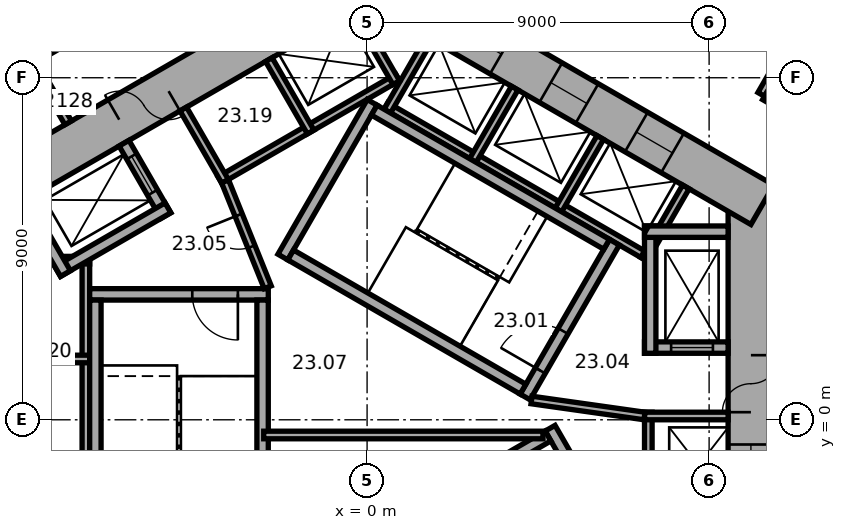
"""IFC4 building model, lengths in metres.
Left out: names, types, materials, properties, quantities, classifications, styles, units other than length and angle.
Written with IfcOpenShell. Run it as: python <this file> out.ifc"""

import sys

from ifc_helpers import new_model, si_unit, direction, frame, frame_2d, origin, place, context, subcontext, project, spatial, rectangle, extrude, element, fill, save


model = new_model("IFC4")
c1 = context("Model", 3, precision=1e-05, world=origin(), true_north=direction((0.0, 1.0)))
c2 = subcontext(c1, "Body", "Model", "MODEL_VIEW")
j1 = project(units=[si_unit("LENGTHUNIT", "METRE"), si_unit("PLANEANGLEUNIT", "RADIAN")], contexts=[c1])
p1 = place(None, origin())
s1 = spatial("IfcSite", under=j1, at=p1, CompositionType="ELEMENT")
p2 = place(p1, origin())
s2 = spatial("IfcBuilding", under=s1, at=p2, CompositionType="ELEMENT")
p3 = place(p2, frame((0.0, 0.0, 100.1)))
s3 = spatial("IfcBuildingStorey", under=s2, at=p3, CompositionType="ELEMENT", Elevation=100.1)
p4 = place(p3, frame((10.1, -6.177, 0.0), z_axis=(0.0, 0.0, 1.0), x_axis=(0.0, 1.0, 0.0)))
e1 = element("IfcWall", 1, at=p4, inside=s3, PredefinedType="SHEAR", context=c2, shape_type="SweptSolid", body=[
    extrude(rectangle(XDim=12.355, YDim=1.2, at=frame_2d((6.177, 0.0))), origin(), (0.0, 0.0, 1.0), 3.3),
])
p5 = place(p4, frame((6.378, 0.0, 0.0)))
e2 = element("IfcOpeningElement", 2, at=p5, cuts=e1, PredefinedType="OPENING", context=c2, shape_type="SweptSolid", body=[
    extrude(rectangle(XDim=1.5, YDim=2.1, at=frame_2d((0.75, 1.05))), frame((0.0, 0.61, 0.0), z_axis=(0.0, -1.0, 0.0), x_axis=(1.0, 0.0, 0.0)), (0.0, 0.0, 1.0), 1.22),
])
p6 = place(p4, frame((1.828, 0.0, 0.0)))
e3 = element("IfcOpeningElement", 3, at=p6, cuts=e1, PredefinedType="OPENING", context=c2, shape_type="SweptSolid", body=[
    extrude(rectangle(XDim=1.1, YDim=2.1, at=frame_2d((0.55, 1.05))), frame((0.0, 0.61, 0.0), z_axis=(0.0, -1.0, 0.0), x_axis=(1.0, 0.0, 0.0)), (0.0, 0.0, 1.0), 1.22),
])
p7 = place(p4, frame((4.427, 0.0, 0.0)))
e4 = element("IfcOpeningElement", 4, at=p7, cuts=e1, PredefinedType="OPENING", context=c2, shape_type="SweptSolid", body=[
    extrude(rectangle(XDim=1.1, YDim=2.1, at=frame_2d((0.55, 1.05))), frame((0.0, 0.61, 0.0), z_axis=(0.0, -1.0, 0.0), x_axis=(1.0, 0.0, 0.0)), (0.0, 0.0, 1.0), 1.22),
])
p8 = place(p3, frame((10.4, 5.658, 0.0), z_axis=(0.0, 0.0, 1.0), x_axis=(-0.866021384402, 0.500006961711, 0.0)))
e5 = element("IfcWall", 5, at=p8, inside=s3, PredefinedType="SHEAR", context=c2, shape_type="SweptSolid", body=[
    extrude(rectangle(XDim=12.355, YDim=1.2, at=frame_2d((6.178, 0.0))), origin(), (0.0, 0.0, 1.0), 3.3),
])
p9 = place(p8, frame((2.728, 0.0, 0.0)))
e6 = element("IfcOpeningElement", 6, at=p9, cuts=e5, PredefinedType="OPENING", context=c2, shape_type="SweptSolid", body=[
    extrude(rectangle(XDim=1.1, YDim=2.1, at=frame_2d((0.55, 1.05))), frame((0.0, 0.61, 0.0), z_axis=(0.0, -1.0, 0.0), x_axis=(1.0, 0.0, 0.0)), (0.0, 0.0, 1.0), 1.22),
])
p10 = place(p8, frame((5.328, 0.0, 0.0)))
e7 = element("IfcOpeningElement", 7, at=p10, cuts=e5, PredefinedType="OPENING", context=c2, shape_type="SweptSolid", body=[
    extrude(rectangle(XDim=1.1, YDim=2.1, at=frame_2d((0.55, 1.05))), frame((0.0, 0.61, 0.0), z_axis=(0.0, -1.0, 0.0), x_axis=(1.0, 0.0, 0.0)), (0.0, 0.0, 1.0), 1.22),
])
p11 = place(p8, frame((7.928, 0.0, 0.0)))
e8 = element("IfcOpeningElement", 8, at=p11, cuts=e5, PredefinedType="OPENING", context=c2, shape_type="SweptSolid", body=[
    extrude(rectangle(XDim=1.1, YDim=2.1, at=frame_2d((0.55, 1.05))), frame((0.0, 0.61, 0.0), z_axis=(0.0, -1.0, 0.0), x_axis=(1.0, 0.0, 0.0)), (0.0, 0.0, 1.0), 1.22),
])
p12 = place(p3, frame((0.3, 11.836, 0.0), z_axis=(0.0, 0.0, 1.0), x_axis=(-0.866021384402, -0.500006961711, 0.0)))
e9 = element("IfcWall", 9, at=p12, inside=s3, PredefinedType="SHEAR", context=c2, shape_type="SweptSolid", body=[
    extrude(rectangle(XDim=12.355, YDim=1.2, at=frame_2d((6.178, 0.0))), origin(), (0.0, 0.0, 1.0), 3.3),
])
p13 = place(p12, frame((6.378, 0.0, 0.0)))
e10 = element("IfcOpeningElement", 10, at=p13, cuts=e9, PredefinedType="OPENING", context=c2, shape_type="SweptSolid", body=[
    extrude(rectangle(XDim=1.5, YDim=2.1, at=frame_2d((0.75, 1.05))), frame((0.0, 0.61, 0.0), z_axis=(0.0, -1.0, 0.0), x_axis=(1.0, 0.0, 0.0)), (0.0, 0.0, 1.0), 1.22),
])
p14 = place(p12, frame((1.828, 0.0, 0.0)))
e11 = element("IfcOpeningElement", 11, at=p14, cuts=e9, PredefinedType="OPENING", context=c2, shape_type="SweptSolid", body=[
    extrude(rectangle(XDim=1.1, YDim=2.1, at=frame_2d((0.55, 1.05))), frame((0.0, 0.61, 0.0), z_axis=(0.0, -1.0, 0.0), x_axis=(1.0, 0.0, 0.0)), (0.0, 0.0, 1.0), 1.22),
])
p15 = place(p3, frame((7.4, -5.2, 0.0), z_axis=(0.0, 0.0, 1.0), x_axis=(0.0, 1.0, 0.0)))
e12 = element("IfcWall", 12, at=p15, inside=s3, PredefinedType="PARTITIONING", context=c2, shape_type="SweptSolid", body=[
    extrude(rectangle(XDim=5.4, YDim=0.2, at=frame_2d((2.7, 0.0))), origin(), (0.0, 0.0, 1.0), 3.05),
])
p16 = place(p3, frame((7.3, 0.1, 0.0), z_axis=(0.0, 0.0, 1.0), x_axis=(1.0, 0.0, 0.0)))
e13 = element("IfcWall", 13, at=p16, inside=s3, PredefinedType="PARTITIONING", context=c2, shape_type="SweptSolid", body=[
    extrude(rectangle(XDim=2.2, YDim=0.2, at=frame_2d((1.1, 0.0))), origin(), (0.0, 0.0, 1.0), 3.05),
])
p17 = place(p3, frame((7.424, 4.259, 0.0), z_axis=(0.0, 0.0, 1.0), x_axis=(-0.866026010844, 0.49999894854, 0.0)))
e14 = element("IfcWall", 14, at=p17, inside=s3, PredefinedType="PARTITIONING", context=c2, shape_type="SweptSolid", body=[
    extrude(rectangle(XDim=8.0, YDim=0.2, at=frame_2d((4.0, 0.0))), origin(), (0.0, 0.0, 1.0), 3.05),
])
for number, where, z_axis, x_axis in (
    (15, (7.287, 4.222, 0.0), (0.0, 0.0, 1.0), (0.5, 0.866, 0.0)),
    (16, (5.036, 5.522, 0.0), (0.0, 0.0, 1.0), (0.5, 0.866, 0.0)),
    (17, (2.784, 6.822, 0.0), (0.0, 0.0, 1.0), (0.5, 0.866, 0.0)),
    (18, (0.532, 8.122, 0.0), (0.0, 0.0, 1.0), (0.5, 0.866, 0.0)),
):
    element("IfcWall", number, at=place(p3, frame(where, z_axis=z_axis, x_axis=x_axis)), inside=s3, PredefinedType="PARTITIONING", context=c2, shape_type="SweptSolid", body=[
        extrude(rectangle(XDim=2.2, YDim=0.2, at=frame_2d((1.1, 0.0))), origin(), (0.0, 0.0, 1.0), 3.05),
    ])
p18 = place(p3, frame((0.803, 9.009, 0.0), z_axis=(0.0, 0.0, 1.0), x_axis=(-0.866028230842, -0.499995103361, 0.0)))
e19 = element("IfcWall", 19, at=p18, inside=s3, PredefinedType="PARTITIONING", context=c2, shape_type="SweptSolid", body=[
    extrude(rectangle(XDim=5.4, YDim=0.2, at=frame_2d((2.7, 0.0))), origin(), (0.0, 0.0, 1.0), 3.05),
])
p19 = place(p3, frame((0.767, 8.872, 0.0), z_axis=(0.0, 0.0, 1.0), x_axis=(-0.499994660107, 0.866028486751, 0.0)))
e20 = element("IfcWall", 20, at=p19, inside=s3, PredefinedType="PARTITIONING", context=c2, shape_type="SweptSolid", body=[
    extrude(rectangle(XDim=2.2, YDim=0.2, at=frame_2d((1.1, 0.0))), origin(), (0.0, 0.0, 1.0), 3.05),
])
for number, where, z_axis, x_axis in (
    (21, (-1.485, 7.572, 0.0), (0.0, 0.0, 1.0), (-0.5, 0.866, 0.0)),
    (22, (-3.737, 6.272, 0.0), (0.0, 0.0, 1.0), (-0.5, 0.866, 0.0)),
):
    element("IfcWall", number, at=place(p3, frame(where, z_axis=z_axis, x_axis=x_axis)), inside=s3, PredefinedType="PARTITIONING", context=c2, shape_type="SweptSolid", body=[
        extrude(rectangle(XDim=2.2, YDim=0.2, at=frame_2d((1.1, 0.0))), origin(), (0.0, 0.0, 1.0), 3.05),
    ])
p20 = place(p3, frame((-7.4, 4.3, 0.0), z_axis=(0.0, 0.0, 1.0), x_axis=(0.0, -1.0, 0.0)))
e23 = element("IfcWall", 23, at=p20, inside=s3, PredefinedType="PARTITIONING", context=c2, shape_type="SweptSolid", body=[
    extrude(rectangle(XDim=8.0, YDim=0.2, at=frame_2d((4.0, 0.0))), origin(), (0.0, 0.0, 1.0), 3.05),
])
for number, where, z_axis, x_axis in (
    (24, (-7.3, 4.2, 0.0), (0.0, 0.0, 1.0), (-1.0, 0.0, 0.0)),
    (25, (-7.3, 1.6, 0.0), (0.0, 0.0, 1.0), (-1.0, 0.0, 0.0)),
):
    element("IfcWall", number, at=place(p3, frame(where, z_axis=z_axis, x_axis=x_axis)), inside=s3, PredefinedType="PARTITIONING", context=c2, shape_type="SweptSolid", body=[
        extrude(rectangle(XDim=2.2, YDim=0.2, at=frame_2d((1.1, 0.0))), origin(), (0.0, 0.0, 1.0), 3.05),
    ])
p21 = place(p3, frame((4.158, 0.602, 0.0), z_axis=(0.0, 0.0, 1.0), x_axis=(0.499977259774, 0.866038532462, 0.0)))
e26 = element("IfcWall", 26, at=p21, inside=s3, PredefinedType="SHEAR", context=c2, shape_type="SweptSolid", body=[
    extrude(rectangle(XDim=4.7, YDim=0.3, at=frame_2d((2.35, 0.0))), origin(), (0.0, 0.0, 1.0), 3.05),
])
p22 = place(p21, frame((0.8, 0.0, 0.0)))
e27 = element("IfcOpeningElement", 27, at=p22, cuts=e26, PredefinedType="OPENING", context=c2, shape_type="SweptSolid", body=[
    extrude(rectangle(XDim=1.2, YDim=2.1, at=frame_2d((0.6, 1.05))), frame((0.0, 0.16, 0.0), z_axis=(0.0, -1.0, 0.0), x_axis=(1.0, 0.0, 0.0)), (0.0, 0.0, 1.0), 0.32),
])
p23 = place(p3, frame((-2.216, 4.282, 0.0), z_axis=(0.0, 0.0, 1.0), x_axis=(0.499977259774, 0.866038532462, 0.0)))
e28 = element("IfcWall", 28, at=p23, inside=s3, PredefinedType="SHEAR", context=c2, shape_type="SweptSolid", body=[
    extrude(rectangle(XDim=4.7, YDim=0.3, at=frame_2d((2.35, 0.0))), origin(), (0.0, 0.0, 1.0), 3.05),
])
for number, where, z_axis, x_axis in (
    (29, (4.103, 0.807, 0.0), (0.0, 0.0, 1.0), (-0.866, 0.5, 0.0)),
    (30, (6.303, 4.617, 0.0), (0.0, 0.0, 1.0), (-0.866, 0.5, 0.0)),
):
    element("IfcWall", number, at=place(p3, frame(where, z_axis=z_axis, x_axis=x_axis)), inside=s3, PredefinedType="SHEAR", context=c2, shape_type="SweptSolid", body=[
        extrude(rectangle(XDim=7.06, YDim=0.3, at=frame_2d((3.53, 0.0))), origin(), (0.0, 0.0, 1.0), 3.05),
    ])
p24 = place(p3, frame((-2.6, 3.3, 0.0), z_axis=(0.0, 0.0, 1.0), x_axis=(-1.0, 0.0, 0.0)))
e31 = element("IfcWall", 31, at=p24, inside=s3, PredefinedType="SHEAR", context=c2, shape_type="SweptSolid", body=[
    extrude(rectangle(XDim=4.7, YDim=0.3, at=frame_2d((2.35, 0.0))), origin(), (0.0, 0.0, 1.0), 3.05),
])
p25 = place(p24, frame((0.8, 0.0, 0.0)))
e32 = element("IfcOpeningElement", 32, at=p25, cuts=e31, PredefinedType="OPENING", context=c2, shape_type="SweptSolid", body=[
    extrude(rectangle(XDim=1.2, YDim=2.1, at=frame_2d((0.6, 1.05))), frame((0.0, 0.16, 0.0), z_axis=(0.0, -1.0, 0.0), x_axis=(1.0, 0.0, 0.0)), (0.0, 0.0, 1.0), 0.32),
])
for number, where, z_axis, x_axis in (
    (33, (-2.75, 3.15, 0.0), (0.0, 0.0, 1.0), (0.0, -1.0, 0.0)),
    (34, (-7.15, 3.15, 0.0), (0.0, 0.0, 1.0), (0.0, -1.0, 0.0)),
):
    element("IfcWall", number, at=place(p3, frame(where, z_axis=z_axis, x_axis=x_axis)), inside=s3, PredefinedType="SHEAR", context=c2, shape_type="SweptSolid", body=[
        extrude(rectangle(XDim=7.06, YDim=0.3, at=frame_2d((3.53, 0.0))), origin(), (0.0, 0.0, 1.0), 3.05),
    ])
p26 = place(p3, frame((4.816, -0.222, 0.0), z_axis=(0.0, 0.0, 1.0), x_axis=(0.499977259774, -0.866038532462, 0.0)))
e35 = element("IfcWall", 35, at=p26, inside=s3, PredefinedType="SHEAR", context=c2, shape_type="SweptSolid", body=[
    extrude(rectangle(XDim=4.7, YDim=0.3, at=frame_2d((2.35, 0.0))), origin(), (0.0, 0.0, 1.0), 3.05),
])
p27 = place(p3, frame((-1.353, -3.957, 0.0), z_axis=(0.0, 0.0, 1.0), x_axis=(0.866027801685, 0.499995846692, 0.0)))
e36 = element("IfcWall", 36, at=p27, inside=s3, PredefinedType="SHEAR", context=c2, shape_type="SweptSolid", body=[
    extrude(rectangle(XDim=7.06, YDim=0.3, at=frame_2d((3.53, 0.0))), origin(), (0.0, 0.0, 1.0), 3.05),
])
p28 = place(p3, frame((7.3, 1.9, 0.0), z_axis=(0.0, 0.0, 1.0), x_axis=(1.0, 0.0, 0.0)))
e37 = element("IfcWall", 37, at=p28, inside=s3, PredefinedType="SHEAR", context=c2, shape_type="SweptSolid", body=[
    extrude(rectangle(XDim=2.2, YDim=0.3, at=frame_2d((1.1, 0.0))), origin(), (0.0, 0.0, 1.0), 3.05),
])
p29 = place(p28, frame((0.7, 0.0, 0.0)))
e38 = element("IfcOpeningElement", 38, at=p29, cuts=e37, PredefinedType="OPENING", context=c2, shape_type="SweptSolid", body=[
    extrude(rectangle(XDim=1.1, YDim=2.1, at=frame_2d((0.55, 1.05))), frame((0.0, 0.16, 0.0), z_axis=(0.0, -1.0, 0.0), x_axis=(1.0, 0.0, 0.0)), (0.0, 0.0, 1.0), 0.32),
])
p30 = place(p3, frame((7.45, 1.75, 0.0), z_axis=(0.0, 0.0, 1.0), x_axis=(0.0, 1.0, 0.0)))
e39 = element("IfcWall", 39, at=p30, inside=s3, PredefinedType="SHEAR", context=c2, shape_type="SweptSolid", body=[
    extrude(rectangle(XDim=3.35, YDim=0.3, at=frame_2d((1.675, 0.0))), origin(), (0.0, 0.0, 1.0), 3.05),
])
p31 = place(p3, frame((7.3, 4.95, 0.0), z_axis=(0.0, 0.0, 1.0), x_axis=(1.0, 0.0, 0.0)))
e40 = element("IfcWall", 40, at=p31, inside=s3, PredefinedType="SHEAR", context=c2, shape_type="SweptSolid", body=[
    extrude(rectangle(XDim=2.2, YDim=0.3, at=frame_2d((1.1, 0.0))), origin(), (0.0, 0.0, 1.0), 3.05),
])
p32 = place(p3, frame((4.327, 0.521, 0.0), z_axis=(0.0, 0.0, 1.0), x_axis=(0.990124376366, -0.14019172346, 0.0)))
e41 = element("IfcWall", 41, at=p32, inside=s3, PredefinedType="PARTITIONING", context=c2, shape_type="SweptSolid", body=[
    extrude(rectangle(XDim=3.002, YDim=0.2, at=frame_2d((1.501, 0.0))), origin(), (0.0, 0.0, 1.0), 3.05),
])
p33 = place(p3, frame((-5.295, 5.372, 0.0), z_axis=(0.0, 0.0, 1.0), x_axis=(-0.500077893725, 0.86598042715, 0.0)))
e42 = element("IfcWall", 42, at=p33, inside=s3, PredefinedType="SHEAR", context=c2, shape_type="SweptSolid", body=[
    extrude(rectangle(XDim=2.2, YDim=0.3, at=frame_2d((1.1, 0.0))), origin(), (0.0, 0.0, 1.0), 3.05),
])
p34 = place(p33, frame((0.7, 0.0, 0.0)))
e43 = element("IfcOpeningElement", 43, at=p34, cuts=e42, PredefinedType="OPENING", context=c2, shape_type="SweptSolid", body=[
    extrude(rectangle(XDim=1.1, YDim=2.1, at=frame_2d((0.55, 1.05))), frame((0.0, 0.16, 0.0), z_axis=(0.0, -1.0, 0.0), x_axis=(1.0, 0.0, 0.0)), (0.0, 0.0, 1.0), 0.32),
])
p35 = place(p3, frame((-5.24, 5.577, 0.0), z_axis=(0.0, 0.0, 1.0), x_axis=(-0.866014461049, -0.500018952895, 0.0)))
e44 = element("IfcWall", 44, at=p35, inside=s3, PredefinedType="SHEAR", context=c2, shape_type="SweptSolid", body=[
    extrude(rectangle(XDim=3.35, YDim=0.3, at=frame_2d((1.675, 0.0))), origin(), (0.0, 0.0, 1.0), 3.05),
])
p36 = place(p3, frame((-7.937, 3.847, 0.0), z_axis=(0.0, 0.0, 1.0), x_axis=(-0.50002983664, 0.866008176907, 0.0)))
e45 = element("IfcWall", 45, at=p36, inside=s3, PredefinedType="SHEAR", context=c2, shape_type="SweptSolid", body=[
    extrude(rectangle(XDim=2.2, YDim=0.3, at=frame_2d((1.1, 0.0))), origin(), (0.0, 0.0, 1.0), 3.05),
])
p37 = place(p3, frame((-2.615, 3.487, 0.0), z_axis=(0.0, 0.0, 1.0), x_axis=(-0.373576831041, 0.92759924068, 0.0)))
e46 = element("IfcWall", 46, at=p37, inside=s3, PredefinedType="PARTITIONING", context=c2, shape_type="SweptSolid", body=[
    extrude(rectangle(XDim=3.002, YDim=0.2, at=frame_2d((1.501, 0.0))), origin(), (0.0, 0.0, 1.0), 3.05),
])
p38 = place(p37, frame((1.15, 0.0, 0.0)))
e47 = element("IfcOpeningElement", 47, at=p38, cuts=e46, PredefinedType="OPENING", context=c2, shape_type="SweptSolid", body=[
    extrude(rectangle(XDim=0.9, YDim=2.1, at=frame_2d((0.45, 1.05))), frame((0.0, 0.11, 0.0), z_axis=(0.0, -1.0, 0.0), x_axis=(1.0, 0.0, 0.0)), (0.0, 0.0, 1.0), 0.22),
])
p39 = place(p3, frame((-2.72, -0.4, 0.0), z_axis=(0.0, 0.0, 1.0), x_axis=(1.0, 0.0, 0.0)))
e48 = element("IfcWall", 48, at=p39, inside=s3, PredefinedType="PARTITIONING", context=c2, shape_type="SweptSolid", body=[
    extrude(rectangle(XDim=7.347, YDim=0.2, at=frame_2d((3.674, 0.0))), origin(), (0.0, 0.0, 1.0), 3.05),
])
p40 = place(p3, frame((-7.865, 7.814, 0.0), z_axis=(0.0, 0.0, 1.0), x_axis=(-0.500004234368, 0.866022959057, 0.0)))
e49 = element("IfcWall", 49, at=p40, inside=s3, PredefinedType="PARTITIONING", context=c2, shape_type="SweptSolid", body=[
    extrude(rectangle(XDim=11.25, YDim=0.2, at=frame_2d((5.625, 0.0))), origin(), (0.0, 0.0, 1.0), 3.05),
])
p41 = place(p40, frame((0.5, 0.0, 0.0)))
e50 = element("IfcOpeningElement", 50, at=p41, cuts=e49, PredefinedType="OPENING", context=c2, shape_type="SweptSolid", body=[
    extrude(rectangle(XDim=0.9, YDim=2.1, at=frame_2d((0.45, 1.05))), frame((0.0, 0.11, 0.0), z_axis=(0.0, -1.0, 0.0), x_axis=(1.0, 0.0, 0.0)), (0.0, 0.0, 1.0), 0.22),
])
p42 = place(p3, frame((-4.309, 12.061, 0.0), z_axis=(0.0, 0.0, 1.0), x_axis=(-0.866020679205, -0.500008183122, 0.0)))
e51 = element("IfcWall", 51, at=p42, inside=s3, PredefinedType="PARTITIONING", context=c2, shape_type="SweptSolid", body=[
    extrude(rectangle(XDim=5.104, YDim=0.2, at=frame_2d((2.552, 0.0))), origin(), (0.0, 0.0, 1.0), 3.05),
])
p43 = place(p42, frame((0.827, 0.0, 0.0)))
e52 = element("IfcOpeningElement", 52, at=p43, cuts=e51, PredefinedType="OPENING", context=c2, shape_type="SweptSolid", body=[
    extrude(rectangle(XDim=0.9, YDim=2.1, at=frame_2d((0.45, 1.05))), frame((0.0, 0.11, 0.0), z_axis=(0.0, -1.0, 0.0), x_axis=(1.0, 0.0, 0.0)), (0.0, 0.0, 1.0), 0.22),
])
p44 = place(p3, frame((10.371, 8.561, 0.0), z_axis=(0.0, 0.0, 1.0), x_axis=(0.499986357472, 0.866033280158, 0.0)))
e53 = element("IfcWall", 53, at=p44, inside=s3, PredefinedType="PARTITIONING", context=c2, shape_type="SweptSolid", body=[
    extrude(rectangle(XDim=1.201, YDim=0.2, at=frame_2d((0.601, 0.0))), origin(), (0.0, 0.0, 1.0), 3.05),
])
p45 = place(p3, frame((10.885, 9.652, 0.0), z_axis=(0.0, 0.0, 1.0), x_axis=(-0.866033630405, 0.499985750804, 0.0)))
e54 = element("IfcWall", 54, at=p45, inside=s3, PredefinedType="PARTITIONING", context=c2, shape_type="SweptSolid", body=[
    extrude(rectangle(XDim=8.642, YDim=0.2, at=frame_2d((4.321, 0.0))), origin(), (0.0, 0.0, 1.0), 3.05),
])
p46 = place(p45, frame((2.276, 0.0, 0.0)))
e55 = element("IfcOpeningElement", 55, at=p46, cuts=e54, PredefinedType="OPENING", context=c2, shape_type="SweptSolid", body=[
    extrude(rectangle(XDim=0.9, YDim=2.1, at=frame_2d((0.45, 1.05))), frame((0.0, 0.11, 0.0), z_axis=(0.0, -1.0, 0.0), x_axis=(1.0, 0.0, 0.0)), (0.0, 0.0, 1.0), 0.22),
])
p47 = place(p3, frame((11.566, 7.871, 0.0), z_axis=(0.0, 0.0, 1.0), x_axis=(-0.866004557827, 0.500036104519, 0.0)))
e56 = element("IfcWall", 56, at=p47, inside=s3, PredefinedType="PARTITIONING", context=c2, shape_type="SweptSolid", body=[
    extrude(rectangle(XDim=1.28, YDim=0.2, at=frame_2d((0.64, 0.0))), origin(), (0.0, 0.0, 1.0), 3.05),
])
p48 = place(p5, origin())
e57 = element("IfcDoor", 57, at=p48, inside=s3, OperationType="DOUBLE_DOOR_SINGLE_SWING", PredefinedType="DOOR", context=c2, shape_type="SweptSolid", body=[
    extrude(rectangle(XDim=1.5, YDim=2.1, at=frame_2d((0.75, 1.05))), frame((0.0, 0.025, 0.0), z_axis=(0.0, -1.0, 0.0), x_axis=(1.0, 0.0, 0.0)), (0.0, 0.0, 1.0), 0.05),
])
fill(e2, e57)
p49 = place(p13, origin())
e58 = element("IfcDoor", 58, at=p49, inside=s3, OperationType="DOUBLE_DOOR_SINGLE_SWING", PredefinedType="DOOR", context=c2, shape_type="SweptSolid", body=[
    extrude(rectangle(XDim=1.5, YDim=2.1, at=frame_2d((0.75, 1.05))), frame((0.0, 0.025, 0.0), z_axis=(0.0, -1.0, 0.0), x_axis=(1.0, 0.0, 0.0)), (0.0, 0.0, 1.0), 0.05),
])
fill(e10, e58)
p50 = place(p22, origin())
e59 = element("IfcDoor", 59, at=p50, inside=s3, OperationType="SINGLE_SWING_RIGHT", PredefinedType="DOOR", context=c2, shape_type="SweptSolid", body=[
    extrude(rectangle(XDim=1.2, YDim=2.1, at=frame_2d((0.6, 1.05))), frame((0.0, 0.025, 0.0), z_axis=(0.0, -1.0, 0.0), x_axis=(1.0, 0.0, 0.0)), (0.0, 0.0, 1.0), 0.05),
])
fill(e27, e59)
p51 = place(p25, origin())
e60 = element("IfcDoor", 60, at=p51, inside=s3, OperationType="SINGLE_SWING_RIGHT", PredefinedType="DOOR", context=c2, shape_type="SweptSolid", body=[
    extrude(rectangle(XDim=1.2, YDim=2.1, at=frame_2d((0.6, 1.05))), frame((0.0, 0.025, 0.0), z_axis=(0.0, -1.0, 0.0), x_axis=(1.0, 0.0, 0.0)), (0.0, 0.0, 1.0), 0.05),
])
fill(e32, e60)
p52 = place(p38, origin())
e61 = element("IfcDoor", 61, at=p52, inside=s3, OperationType="SINGLE_SWING_LEFT", PredefinedType="DOOR", context=c2, shape_type="SweptSolid", body=[
    extrude(rectangle(XDim=0.9, YDim=2.1, at=frame_2d((0.45, 1.05))), frame((0.0, 0.025, 0.0), z_axis=(0.0, -1.0, 0.0), x_axis=(1.0, 0.0, 0.0)), (0.0, 0.0, 1.0), 0.05),
])
fill(e47, e61)
p53 = place(p29, origin())
e62 = element("IfcDoor", 62, at=p53, inside=s3, OperationType="DOUBLE_DOOR_SLIDING", PredefinedType="DOOR", context=c2, shape_type="SweptSolid", body=[
    extrude(rectangle(XDim=1.1, YDim=2.1, at=frame_2d((0.55, 1.05))), frame((0.0, 0.025, 0.0), z_axis=(0.0, -1.0, 0.0), x_axis=(1.0, 0.0, 0.0)), (0.0, 0.0, 1.0), 0.05),
])
fill(e38, e62)
p54 = place(p34, origin())
e63 = element("IfcDoor", 63, at=p54, inside=s3, OperationType="DOUBLE_DOOR_SLIDING", PredefinedType="DOOR", context=c2, shape_type="SweptSolid", body=[
    extrude(rectangle(XDim=1.1, YDim=2.1, at=frame_2d((0.55, 1.05))), frame((0.0, 0.025, 0.0), z_axis=(0.0, -1.0, 0.0), x_axis=(1.0, 0.0, 0.0)), (0.0, 0.0, 1.0), 0.05),
])
fill(e43, e63)
p55 = place(p7, origin())
e64 = element("IfcDoor", 64, at=p55, inside=s3, OperationType="DOUBLE_DOOR_SLIDING", PredefinedType="DOOR", context=c2, shape_type="SweptSolid", body=[
    extrude(rectangle(XDim=1.1, YDim=2.1, at=frame_2d((0.55, 1.05))), frame((0.0, 0.025, 0.0), z_axis=(0.0, -1.0, 0.0), x_axis=(1.0, 0.0, 0.0)), (0.0, 0.0, 1.0), 0.05),
])
fill(e4, e64)
p56 = place(p9, origin())
e65 = element("IfcDoor", 65, at=p56, inside=s3, OperationType="DOUBLE_DOOR_SLIDING", PredefinedType="DOOR", context=c2, shape_type="SweptSolid", body=[
    extrude(rectangle(XDim=1.1, YDim=2.1, at=frame_2d((0.55, 1.05))), frame((0.0, 0.025, 0.0), z_axis=(0.0, -1.0, 0.0), x_axis=(1.0, 0.0, 0.0)), (0.0, 0.0, 1.0), 0.05),
])
fill(e6, e65)
p57 = place(p10, origin())
e66 = element("IfcDoor", 66, at=p57, inside=s3, OperationType="DOUBLE_DOOR_SLIDING", PredefinedType="DOOR", context=c2, shape_type="SweptSolid", body=[
    extrude(rectangle(XDim=1.1, YDim=2.1, at=frame_2d((0.55, 1.05))), frame((0.0, 0.025, 0.0), z_axis=(0.0, -1.0, 0.0), x_axis=(1.0, 0.0, 0.0)), (0.0, 0.0, 1.0), 0.05),
])
fill(e7, e66)
p58 = place(p11, origin())
e67 = element("IfcDoor", 67, at=p58, inside=s3, OperationType="DOUBLE_DOOR_SLIDING", PredefinedType="DOOR", context=c2, shape_type="SweptSolid", body=[
    extrude(rectangle(XDim=1.1, YDim=2.1, at=frame_2d((0.55, 1.05))), frame((0.0, 0.025, 0.0), z_axis=(0.0, -1.0, 0.0), x_axis=(1.0, 0.0, 0.0)), (0.0, 0.0, 1.0), 0.05),
])
fill(e8, e67)
p59 = place(p41, origin())
e68 = element("IfcDoor", 68, at=p59, inside=s3, OperationType="SINGLE_SWING_LEFT", PredefinedType="DOOR", context=c2, shape_type="SweptSolid", body=[
    extrude(rectangle(XDim=0.9, YDim=2.1, at=frame_2d((0.45, 1.05))), frame((0.0, 0.025, 0.0), z_axis=(0.0, -1.0, 0.0), x_axis=(1.0, 0.0, 0.0)), (0.0, 0.0, 1.0), 0.05),
])
fill(e50, e68)
save(model, sys.argv[1])
